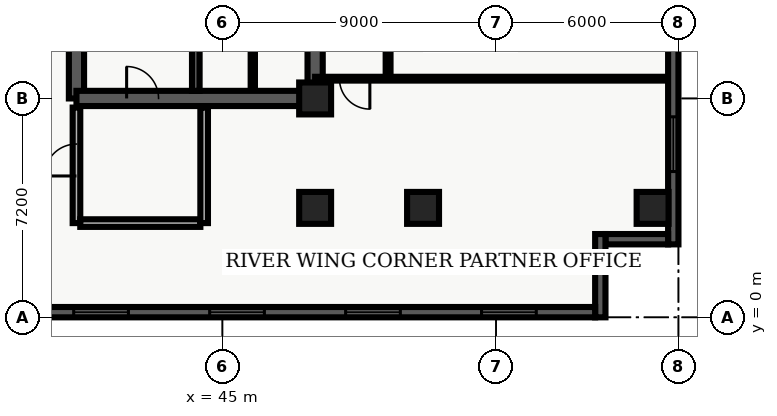
"""IFC4 building model, lengths in metres.
Left out: names, types, materials, properties, quantities, classifications, styles, units other than length and angle.
Written with IfcOpenShell. Run it as: python <this file> out.ifc"""

import sys

from ifc_helpers import new_model, entity, si_unit, converted_unit, direction, frame, origin_with_axes, origin_2d_with_axis, place, context, subcontext, project, spatial, polyline, rectangle, outline, extrude, element, fill, save


model = new_model("IFC4")
c1 = context("Model", 3, precision=1e-05, world=origin_with_axes(), true_north=direction((0.0, 1.0)))
c2 = subcontext(c1, "Body", "Model", "MODEL_VIEW")
j1 = project(units=[si_unit("LENGTHUNIT", "METRE"), converted_unit("PLANEANGLEUNIT", "DEGREE", entity("IfcPlaneAngleMeasure", 0.017), si_unit("PLANEANGLEUNIT", "RADIAN"), dimensions=[0, 0, 0, 0, 0, 0, 0])], contexts=[c1])
p1 = place(None, origin_with_axes())
s1 = spatial("IfcSite", under=j1, at=p1, CompositionType="ELEMENT")
p2 = place(p1, origin_with_axes())
s2 = spatial("IfcBuilding", under=s1, at=p2, CompositionType="ELEMENT")
p3 = place(p2, frame((0.0, 0.0, 171.9), z_axis=(0.0, 0.0, 1.0), x_axis=(1.0, 0.0, 0.0)))
s3 = spatial("IfcBuildingStorey", under=s2, at=p3, CompositionType="ELEMENT", Elevation=171.9)
p4 = place(p3, frame((40.2, 7.2, 0.0), z_axis=(0.0, 0.0, 1.0), x_axis=(0.0, 1.0, 0.0)))
e1 = element("IfcWall", 1, at=p4, inside=s3, PredefinedType="SHEAR", context=c2, shape_type="SweptSolid", body=[
    extrude(outline(polyline([(0.0, -0.25), (15.6, -0.25), (15.6, 0.25), (0.0, 0.25), (0.0, -0.25)])), origin_with_axes(), (0.0, 0.0, 1.0), 3.66),
])
p5 = place(p4, frame((14.475, 0.0, 0.0), z_axis=(0.0, 0.0, 1.0), x_axis=(1.0, 0.0, 0.0)))
e2 = element("IfcOpeningElement", 2, at=p5, cuts=e1, PredefinedType="OPENING", context=c2, shape_type="SweptSolid", body=[
    extrude(rectangle(XDim=1.05, YDim=0.52, at=origin_2d_with_axis()), origin_with_axes(), (0.0, 0.0, 1.0), 2.15),
])
p6 = place(p4, frame((12.75, 0.0, 0.0), z_axis=(0.0, 0.0, 1.0), x_axis=(1.0, 0.0, 0.0)))
e3 = element("IfcOpeningElement", 3, at=p6, cuts=e1, PredefinedType="OPENING", context=c2, shape_type="SweptSolid", body=[
    extrude(rectangle(XDim=1.2, YDim=0.52, at=origin_2d_with_axis()), origin_with_axes(), (0.0, 0.0, 1.0), 2.15),
])
p7 = place(p4, frame((9.3, 0.0, 0.0), z_axis=(0.0, 0.0, 1.0), x_axis=(1.0, 0.0, 0.0)))
e4 = element("IfcOpeningElement", 4, at=p7, cuts=e1, PredefinedType="OPENING", context=c2, shape_type="SweptSolid", body=[
    extrude(rectangle(XDim=0.9, YDim=0.52, at=origin_2d_with_axis()), origin_with_axes(), (0.0, 0.0, 1.0), 2.15),
])
p8 = place(p3, frame((40.2, 7.2, 0.0), z_axis=(0.0, 0.0, 1.0), x_axis=(1.0, 0.0, 0.0)))
e5 = element("IfcWall", 5, at=p8, inside=s3, PredefinedType="SHEAR", context=c2, shape_type="SweptSolid", body=[
    extrude(outline(polyline([(0.0, -0.25), (7.85, -0.25), (7.85, 0.25), (0.0, 0.25), (0.0, -0.25)])), origin_with_axes(), (0.0, 0.0, 1.0), 3.66),
])
p9 = place(p8, frame((2.175, 0.0, 0.0), z_axis=(0.0, 0.0, 1.0), x_axis=(1.0, 0.0, 0.0)))
e6 = element("IfcOpeningElement", 6, at=p9, cuts=e5, PredefinedType="OPENING", context=c2, shape_type="SweptSolid", body=[
    extrude(rectangle(XDim=1.05, YDim=0.52, at=origin_2d_with_axis()), origin_with_axes(), (0.0, 0.0, 1.0), 2.15),
])
p10 = place(p3, frame((48.05, 7.2, 0.0), z_axis=(0.0, 0.0, 1.0), x_axis=(0.0, 1.0, 0.0)))
e7 = element("IfcWall", 7, at=p10, inside=s3, PredefinedType="SHEAR", context=c2, shape_type="SweptSolid", body=[
    extrude(outline(polyline([(0.0, -0.25), (15.6, -0.25), (15.6, 0.25), (0.0, 0.25), (0.0, -0.25)])), origin_with_axes(), (0.0, 0.0, 1.0), 3.66),
])
p11 = place(p10, frame((5.975, 0.0, 0.0), z_axis=(0.0, 0.0, 1.0), x_axis=(1.0, 0.0, 0.0)))
e8 = element("IfcOpeningElement", 8, at=p11, cuts=e7, PredefinedType="OPENING", context=c2, shape_type="SweptSolid", body=[
    extrude(rectangle(XDim=1.05, YDim=0.52, at=origin_2d_with_axis()), origin_with_axes(), (0.0, 0.0, 1.0), 2.15),
])
p12 = place(p10, frame((2.725, 0.0, 0.0), z_axis=(0.0, 0.0, 1.0), x_axis=(1.0, 0.0, 0.0)))
e9 = element("IfcOpeningElement", 9, at=p12, cuts=e7, PredefinedType="OPENING", context=c2, shape_type="SweptSolid", body=[
    extrude(rectangle(XDim=0.95, YDim=0.52, at=origin_2d_with_axis()), origin_with_axes(), (0.0, 0.0, 1.0), 2.15),
])
p13 = place(p3, frame((44.125, 7.45, 0.0), z_axis=(0.0, 0.0, 1.0), x_axis=(0.0, 1.0, 0.0)))
e10 = element("IfcWall", 10, at=p13, inside=s3, PredefinedType="SHEAR", context=c2, shape_type="SweptSolid", body=[
    extrude(outline(polyline([(0.0, -0.125), (15.1, -0.125), (15.1, 0.125), (0.0, 0.125), (0.0, -0.125)])), origin_with_axes(), (0.0, 0.0, 1.0), 3.66),
])
p14 = place(p3, frame((40.2, 3.1, 0.0), z_axis=(0.0, 0.0, 1.0), x_axis=(0.0, 1.0, 0.0)))
e11 = element("IfcWall", 11, at=p14, inside=s3, PredefinedType="SOLIDWALL", context=c2, shape_type="SweptSolid", body=[
    extrude(outline(polyline([(0.0, -0.125), (3.8, -0.125), (3.8, 0.125), (0.0, 0.125), (0.0, -0.125)])), origin_with_axes(), (0.0, 0.0, 1.0), 2.7),
])
p15 = place(p14, frame((2.075, 0.0, 0.0), z_axis=(0.0, 0.0, 1.0), x_axis=(1.0, 0.0, 0.0)))
e12 = element("IfcOpeningElement", 12, at=p15, cuts=e11, PredefinedType="OPENING", context=c2, shape_type="SweptSolid", body=[
    extrude(rectangle(XDim=1.05, YDim=0.27, at=origin_2d_with_axis()), origin_with_axes(), (0.0, 0.0, 1.0), 2.15),
])
p16 = place(p3, frame((40.325, 3.1, 0.0), z_axis=(0.0, 0.0, 1.0), x_axis=(1.0, 0.0, 0.0)))
e13 = element("IfcWall", 13, at=p16, inside=s3, PredefinedType="SOLIDWALL", context=c2, shape_type="SweptSolid", body=[
    extrude(outline(polyline([(0.0, -0.125), (3.95, -0.125), (3.95, 0.125), (0.0, 0.125), (0.0, -0.125)])), origin_with_axes(), (0.0, 0.0, 1.0), 2.7),
])
p17 = place(p3, frame((44.4, 3.1, 0.0), z_axis=(0.0, 0.0, 1.0), x_axis=(0.0, 1.0, 0.0)))
e14 = element("IfcWall", 14, at=p17, inside=s3, PredefinedType="SOLIDWALL", context=c2, shape_type="SweptSolid", body=[
    extrude(outline(polyline([(0.0, -0.125), (3.8, -0.125), (3.8, 0.125), (0.0, 0.125), (0.0, -0.125)])), origin_with_axes(), (0.0, 0.0, 1.0), 2.7),
])
for number, where, z_axis, x_axis in (
    (15, (48.05, 3.6, 0.0), (0.0, 0.0, 1.0), (1.0, 0.0, 0.0)),
    (16, (48.05, 7.2, 0.0), (0.0, 0.0, 1.0), (1.0, 0.0, 0.0)),
    (17, (51.6, 3.6, 0.0), (0.0, 0.0, 1.0), (1.0, 0.0, 0.0)),
    (18, (59.15, 3.6, 0.0), (0.0, 0.0, 1.0), (1.0, 0.0, 0.0)),
):
    element("IfcColumn", number, at=place(p3, frame(where, z_axis=z_axis, x_axis=x_axis)), inside=s3, PredefinedType="COLUMN", context=c2, shape_type="SweptSolid", body=[
        extrude(rectangle(XDim=1.05, YDim=1.05, at=origin_2d_with_axis()), origin_with_axes(), (0.0, 0.0, 1.0), 3.9),
    ])
p18 = place(p3, frame((46.0, 7.5, 0.0), z_axis=(0.0, 0.0, 1.0), x_axis=(0.0, 1.0, 0.0)))
e19 = element("IfcWall", 19, at=p18, inside=s3, PredefinedType="PARTITIONING", context=c2, shape_type="SweptSolid", body=[
    extrude(outline(polyline([(0.0, -0.07), (4.08, -0.07), (4.08, 0.07), (0.0, 0.07), (0.0, -0.07)])), origin_with_axes(), (0.0, 0.0, 1.0), 2.7),
])
p19 = place(p18, frame((2.0, 0.0, 0.0), z_axis=(0.0, 0.0, 1.0), x_axis=(1.0, 0.0, 0.0)))
e20 = element("IfcOpeningElement", 20, at=p19, cuts=e19, PredefinedType="OPENING", context=c2, shape_type="SweptSolid", body=[
    extrude(rectangle(XDim=0.9, YDim=0.16, at=origin_2d_with_axis()), origin_with_axes(), (0.0, 0.0, 1.0), 2.15),
])
p20 = place(p3, frame((50.45, 7.85, 0.0), z_axis=(0.0, 0.0, 1.0), x_axis=(0.0, 1.0, 0.0)))
e21 = element("IfcWall", 21, at=p20, inside=s3, PredefinedType="PARTITIONING", context=c2, shape_type="SweptSolid", body=[
    extrude(outline(polyline([(0.0, -0.08), (18.8, -0.08), (18.8, 0.08), (0.0, 0.08), (0.0, -0.08)])), origin_with_axes(), (0.0, 0.0, 1.0), 2.7),
])
p21 = place(p20, frame((6.934, 0.0, 0.0), z_axis=(0.0, 0.0, 1.0), x_axis=(1.0, 0.0, 0.0)))
e22 = element("IfcOpeningElement", 22, at=p21, cuts=e21, PredefinedType="OPENING", context=c2, shape_type="SweptSolid", body=[
    extrude(rectangle(XDim=1.0, YDim=0.18, at=origin_2d_with_axis()), origin_with_axes(), (0.0, 0.0, 1.0), 2.15),
])
p22 = place(p20, frame((12.373, 0.0, 0.0), z_axis=(0.0, 0.0, 1.0), x_axis=(1.0, 0.0, 0.0)))
e23 = element("IfcOpeningElement", 23, at=p22, cuts=e21, PredefinedType="OPENING", context=c2, shape_type="SweptSolid", body=[
    extrude(rectangle(XDim=1.0, YDim=0.18, at=origin_2d_with_axis()), origin_with_axes(), (0.0, 0.0, 1.0), 2.15),
])
p23 = place(p20, frame((17.893, 0.0, 0.0), z_axis=(0.0, 0.0, 1.0), x_axis=(1.0, 0.0, 0.0)))
e24 = element("IfcOpeningElement", 24, at=p23, cuts=e21, PredefinedType="OPENING", context=c2, shape_type="SweptSolid", body=[
    extrude(rectangle(XDim=1.0, YDim=0.18, at=origin_2d_with_axis()), origin_with_axes(), (0.0, 0.0, 1.0), 2.15),
])
p24 = place(p3, frame((59.665, 7.85, 0.0), z_axis=(0.0, 0.0, 1.0), x_axis=(-1.0, 0.0, 0.0)))
e25 = element("IfcWall", 25, at=p24, inside=s3, PredefinedType="PARTITIONING", context=c2, shape_type="SweptSolid", body=[
    extrude(outline(polyline([(0.0, -0.062), (11.615, -0.062), (11.615, 0.062), (0.0, 0.062), (0.0, -0.062)])), origin_with_axes(), (0.0, 0.0, 1.0), 2.7),
])
p25 = place(p24, frame((10.315, 0.0, 0.0), z_axis=(0.0, 0.0, 1.0), x_axis=(1.0, 0.0, 0.0)))
e26 = element("IfcOpeningElement", 26, at=p25, cuts=e25, PredefinedType="OPENING", context=c2, shape_type="SweptSolid", body=[
    extrude(rectangle(XDim=1.0, YDim=0.145, at=origin_2d_with_axis()), origin_with_axes(), (0.0, 0.0, 1.0), 2.15),
])
p26 = place(p3, frame((59.83, 26.06, 0.0), z_axis=(0.0, 0.0, 1.0), x_axis=(0.0, -1.0, 0.0)))
e27 = element("IfcWall", 27, at=p26, inside=s3, PredefinedType="SOLIDWALL", context=c2, shape_type="SweptSolid", body=[
    extrude(outline(polyline([(0.0, -0.17), (23.66, -0.17), (23.66, 0.17), (0.0, 0.17), (0.0, -0.17)])), origin_with_axes(), (0.0, 0.0, 1.0), 3.66),
])
p27 = place(p26, frame((11.83, 0.0, 0.45), z_axis=(0.0, 0.0, 1.0), x_axis=(1.0, 0.0, 0.0)))
e28 = element("IfcOpeningElement", 28, at=p27, cuts=e27, PredefinedType="OPENING", context=c2, shape_type="SweptSolid", body=[
    extrude(rectangle(XDim=1.8, YDim=0.36, at=origin_2d_with_axis()), origin_with_axes(), (0.0, 0.0, 1.0), 2.1),
])
p28 = place(p26, frame((20.364, 0.0, 0.45), z_axis=(0.0, 0.0, 1.0), x_axis=(1.0, 0.0, 0.0)))
e29 = element("IfcOpeningElement", 29, at=p28, cuts=e27, PredefinedType="OPENING", context=c2, shape_type="SweptSolid", body=[
    extrude(rectangle(XDim=1.8, YDim=0.36, at=origin_2d_with_axis()), origin_with_axes(), (0.0, 0.0, 1.0), 2.1),
])
p29 = place(p3, frame((59.66, 2.57, 0.0), z_axis=(0.0, 0.0, 1.0), x_axis=(-1.0, 0.0, 0.0)))
e30 = element("IfcWall", 30, at=p29, inside=s3, PredefinedType="SOLIDWALL", context=c2, shape_type="SweptSolid", body=[
    extrude(outline(polyline([(0.0, -0.17), (2.06, -0.17), (2.06, 0.17), (0.0, 0.17), (0.0, -0.17)])), origin_with_axes(), (0.0, 0.0, 1.0), 3.66),
])
p30 = place(p3, frame((57.43, 2.74, 0.0), z_axis=(0.0, 0.0, 1.0), x_axis=(0.0, -1.0, 0.0)))
e31 = element("IfcWall", 31, at=p30, inside=s3, PredefinedType="SOLIDWALL", context=c2, shape_type="SweptSolid", body=[
    extrude(outline(polyline([(0.0, -0.17), (2.74, -0.17), (2.74, 0.17), (0.0, 0.17), (0.0, -0.17)])), origin_with_axes(), (0.0, 0.0, 1.0), 3.66),
])
p31 = place(p3, frame((57.26, 0.17, 0.0), z_axis=(0.0, 0.0, 1.0), x_axis=(-1.0, 0.0, 0.0)))
e32 = element("IfcWall", 32, at=p31, inside=s3, PredefinedType="SOLIDWALL", context=c2, shape_type="SweptSolid", body=[
    extrude(outline(polyline([(0.0, -0.17), (54.86, -0.17), (54.86, 0.17), (0.0, 0.17), (0.0, -0.17)])), origin_with_axes(), (0.0, 0.0, 1.0), 3.66),
])
p32 = place(p31, frame((2.836, 0.0, 0.45), z_axis=(0.0, 0.0, 1.0), x_axis=(1.0, 0.0, 0.0)))
e33 = element("IfcOpeningElement", 33, at=p32, cuts=e32, PredefinedType="OPENING", context=c2, shape_type="SweptSolid", body=[
    extrude(rectangle(XDim=1.8, YDim=0.36, at=origin_2d_with_axis()), origin_with_axes(), (0.0, 0.0, 1.0), 2.1),
])
p33 = place(p31, frame((7.307, 0.0, 0.45), z_axis=(0.0, 0.0, 1.0), x_axis=(1.0, 0.0, 0.0)))
e34 = element("IfcOpeningElement", 34, at=p33, cuts=e32, PredefinedType="OPENING", context=c2, shape_type="SweptSolid", body=[
    extrude(rectangle(XDim=1.8, YDim=0.36, at=origin_2d_with_axis()), origin_with_axes(), (0.0, 0.0, 1.0), 2.1),
])
p34 = place(p31, frame((11.779, 0.0, 0.45), z_axis=(0.0, 0.0, 1.0), x_axis=(1.0, 0.0, 0.0)))
e35 = element("IfcOpeningElement", 35, at=p34, cuts=e32, PredefinedType="OPENING", context=c2, shape_type="SweptSolid", body=[
    extrude(rectangle(XDim=1.8, YDim=0.36, at=origin_2d_with_axis()), origin_with_axes(), (0.0, 0.0, 1.0), 2.1),
])
p35 = place(p31, frame((16.251, 0.0, 0.45), z_axis=(0.0, 0.0, 1.0), x_axis=(1.0, 0.0, 0.0)))
e36 = element("IfcOpeningElement", 36, at=p35, cuts=e32, PredefinedType="OPENING", context=c2, shape_type="SweptSolid", body=[
    extrude(rectangle(XDim=1.8, YDim=0.36, at=origin_2d_with_axis()), origin_with_axes(), (0.0, 0.0, 1.0), 2.1),
])
p36 = place(p31, frame((20.723, 0.0, 0.45), z_axis=(0.0, 0.0, 1.0), x_axis=(1.0, 0.0, 0.0)))
e37 = element("IfcOpeningElement", 37, at=p36, cuts=e32, PredefinedType="OPENING", context=c2, shape_type="SweptSolid", body=[
    extrude(rectangle(XDim=1.8, YDim=0.36, at=origin_2d_with_axis()), origin_with_axes(), (0.0, 0.0, 1.0), 2.1),
])
p37 = place(p31, frame((25.194, 0.0, 0.45), z_axis=(0.0, 0.0, 1.0), x_axis=(1.0, 0.0, 0.0)))
e38 = element("IfcOpeningElement", 38, at=p37, cuts=e32, PredefinedType="OPENING", context=c2, shape_type="SweptSolid", body=[
    extrude(rectangle(XDim=1.8, YDim=0.36, at=origin_2d_with_axis()), origin_with_axes(), (0.0, 0.0, 1.0), 2.1),
])
p38 = place(p31, frame((29.666, 0.0, 0.45), z_axis=(0.0, 0.0, 1.0), x_axis=(1.0, 0.0, 0.0)))
e39 = element("IfcOpeningElement", 39, at=p38, cuts=e32, PredefinedType="OPENING", context=c2, shape_type="SweptSolid", body=[
    extrude(rectangle(XDim=1.8, YDim=0.36, at=origin_2d_with_axis()), origin_with_axes(), (0.0, 0.0, 1.0), 2.1),
])
p39 = place(p31, frame((34.138, 0.0, 0.45), z_axis=(0.0, 0.0, 1.0), x_axis=(1.0, 0.0, 0.0)))
e40 = element("IfcOpeningElement", 40, at=p39, cuts=e32, PredefinedType="OPENING", context=c2, shape_type="SweptSolid", body=[
    extrude(rectangle(XDim=1.8, YDim=0.36, at=origin_2d_with_axis()), origin_with_axes(), (0.0, 0.0, 1.0), 2.1),
])
p40 = place(p31, frame((38.609, 0.0, 0.45), z_axis=(0.0, 0.0, 1.0), x_axis=(1.0, 0.0, 0.0)))
e41 = element("IfcOpeningElement", 41, at=p40, cuts=e32, PredefinedType="OPENING", context=c2, shape_type="SweptSolid", body=[
    extrude(rectangle(XDim=1.8, YDim=0.36, at=origin_2d_with_axis()), origin_with_axes(), (0.0, 0.0, 1.0), 2.1),
])
p41 = place(p31, frame((43.081, 0.0, 0.45), z_axis=(0.0, 0.0, 1.0), x_axis=(1.0, 0.0, 0.0)))
e42 = element("IfcOpeningElement", 42, at=p41, cuts=e32, PredefinedType="OPENING", context=c2, shape_type="SweptSolid", body=[
    extrude(rectangle(XDim=1.8, YDim=0.36, at=origin_2d_with_axis()), origin_with_axes(), (0.0, 0.0, 1.0), 2.1),
])
p42 = place(p31, frame((47.553, 0.0, 0.45), z_axis=(0.0, 0.0, 1.0), x_axis=(1.0, 0.0, 0.0)))
e43 = element("IfcOpeningElement", 43, at=p42, cuts=e32, PredefinedType="OPENING", context=c2, shape_type="SweptSolid", body=[
    extrude(rectangle(XDim=1.8, YDim=0.36, at=origin_2d_with_axis()), origin_with_axes(), (0.0, 0.0, 1.0), 2.1),
])
p43 = place(p31, frame((52.024, 0.0, 0.45), z_axis=(0.0, 0.0, 1.0), x_axis=(1.0, 0.0, 0.0)))
e44 = element("IfcOpeningElement", 44, at=p43, cuts=e32, PredefinedType="OPENING", context=c2, shape_type="SweptSolid", body=[
    extrude(rectangle(XDim=1.8, YDim=0.36, at=origin_2d_with_axis()), origin_with_axes(), (0.0, 0.0, 1.0), 2.1),
])
p44 = place(p8, frame((2.175, 0.0, 0.0), z_axis=(0.0, 0.0, 1.0), x_axis=(1.0, 0.0, 0.0)))
e45 = element("IfcDoor", 45, at=p44, inside=s3, OperationType="SINGLE_SWING_LEFT", PredefinedType="DOOR", context=c2, shape_type="SweptSolid", body=[
    extrude(rectangle(XDim=1.05, YDim=0.09, at=origin_2d_with_axis()), origin_with_axes(), (0.0, 0.0, 1.0), 2.15),
])
fill(e6, e45)
p45 = place(p14, frame((2.075, 0.0, 0.0), z_axis=(0.0, 0.0, 1.0), x_axis=(1.0, 0.0, 0.0)))
e46 = element("IfcDoor", 46, at=p45, inside=s3, OperationType="SINGLE_SWING_LEFT", PredefinedType="DOOR", context=c2, shape_type="SweptSolid", body=[
    extrude(rectangle(XDim=1.05, YDim=0.09, at=origin_2d_with_axis()), origin_with_axes(), (0.0, 0.0, 1.0), 2.15),
])
fill(e12, e46)
p46 = place(p24, frame((10.315, 0.0, 0.0), z_axis=(0.0, 0.0, 1.0), x_axis=(1.0, 0.0, 0.0)))
e47 = element("IfcDoor", 47, at=p46, inside=s3, OperationType="SINGLE_SWING_LEFT", PredefinedType="DOOR", context=c2, shape_type="SweptSolid", body=[
    extrude(rectangle(XDim=1.0, YDim=0.075, at=origin_2d_with_axis()), origin_with_axes(), (0.0, 0.0, 1.0), 2.15),
])
fill(e26, e47)
p47 = place(p26, frame((20.364, 0.0, 0.45), z_axis=(0.0, 0.0, 1.0), x_axis=(1.0, 0.0, 0.0)))
e48 = element("IfcWindow", 48, at=p47, inside=s3, PredefinedType="WINDOW", context=c2, shape_type="SweptSolid", body=[
    extrude(rectangle(XDim=1.8, YDim=0.09, at=origin_2d_with_axis()), origin_with_axes(), (0.0, 0.0, 1.0), 2.1),
])
fill(e29, e48)
p48 = place(p31, frame((2.836, 0.0, 0.45), z_axis=(0.0, 0.0, 1.0), x_axis=(1.0, 0.0, 0.0)))
e49 = element("IfcWindow", 49, at=p48, inside=s3, PredefinedType="WINDOW", context=c2, shape_type="SweptSolid", body=[
    extrude(rectangle(XDim=1.8, YDim=0.09, at=origin_2d_with_axis()), origin_with_axes(), (0.0, 0.0, 1.0), 2.1),
])
fill(e33, e49)
p49 = place(p31, frame((7.307, 0.0, 0.45), z_axis=(0.0, 0.0, 1.0), x_axis=(1.0, 0.0, 0.0)))
e50 = element("IfcWindow", 50, at=p49, inside=s3, PredefinedType="WINDOW", context=c2, shape_type="SweptSolid", body=[
    extrude(rectangle(XDim=1.8, YDim=0.09, at=origin_2d_with_axis()), origin_with_axes(), (0.0, 0.0, 1.0), 2.1),
])
fill(e34, e50)
p50 = place(p31, frame((11.779, 0.0, 0.45), z_axis=(0.0, 0.0, 1.0), x_axis=(1.0, 0.0, 0.0)))
e51 = element("IfcWindow", 51, at=p50, inside=s3, PredefinedType="WINDOW", context=c2, shape_type="SweptSolid", body=[
    extrude(rectangle(XDim=1.8, YDim=0.09, at=origin_2d_with_axis()), origin_with_axes(), (0.0, 0.0, 1.0), 2.1),
])
fill(e35, e51)
p51 = place(p31, frame((16.251, 0.0, 0.45), z_axis=(0.0, 0.0, 1.0), x_axis=(1.0, 0.0, 0.0)))
e52 = element("IfcWindow", 52, at=p51, inside=s3, PredefinedType="WINDOW", context=c2, shape_type="SweptSolid", body=[
    extrude(rectangle(XDim=1.8, YDim=0.09, at=origin_2d_with_axis()), origin_with_axes(), (0.0, 0.0, 1.0), 2.1),
])
fill(e36, e52)
save(model, sys.argv[1])
